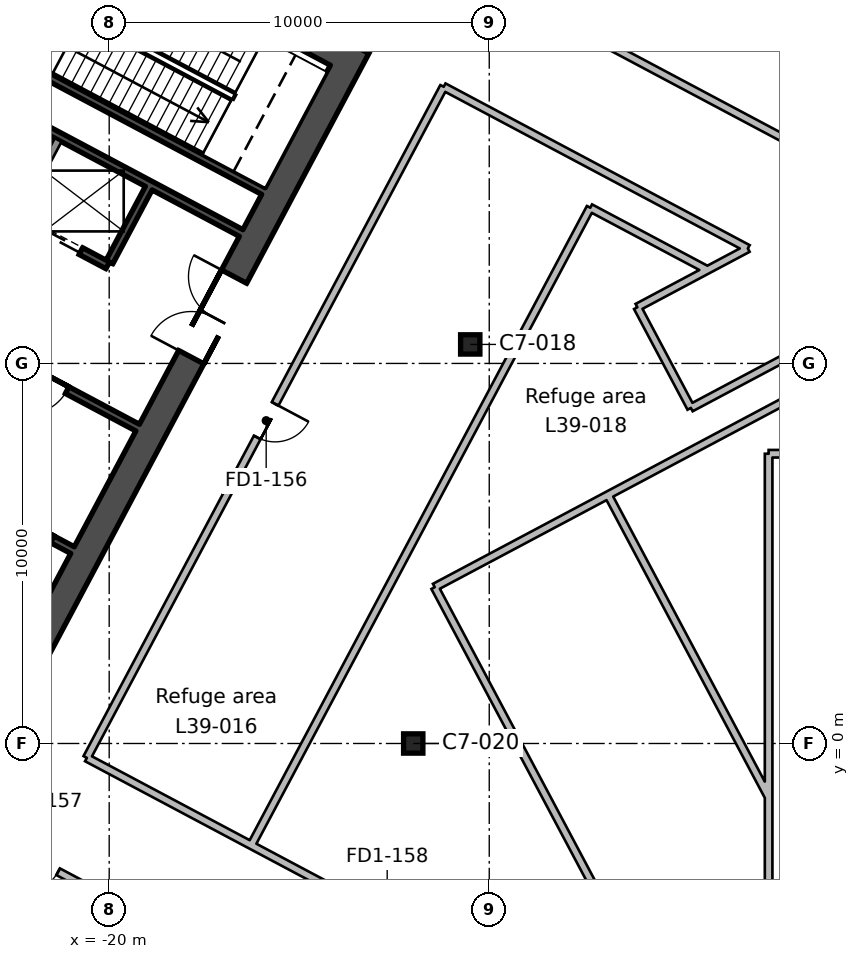
"""IFC4 building model, lengths in metres.
Left out: names, types, materials, properties, quantities, classifications, styles, units other than length and angle.
Written with IfcOpenShell. Run it as: python <this file> out.ifc"""

import sys

from ifc_helpers import new_model, si_unit, direction, frame, frame_2d, origin, origin_2d, place, context, subcontext, project, spatial, rectangle, hollow_rectangle, extrude, element, fill, save


model = new_model("IFC4")
c1 = context("Model", 3, precision=1e-05, world=origin(), true_north=direction((0.0, 1.0)))
c2 = subcontext(c1, "Body", "Model", "MODEL_VIEW")
j1 = project(units=[si_unit("LENGTHUNIT", "METRE"), si_unit("PLANEANGLEUNIT", "RADIAN")], contexts=[c1])
p1 = place(None, origin())
s1 = spatial("IfcSite", under=j1, at=p1, CompositionType="ELEMENT")
p2 = place(p1, origin())
s2 = spatial("IfcBuilding", under=s1, at=p2, CompositionType="ELEMENT")
p3 = place(p2, frame((0.0, 0.0, 183.6)))
s3 = spatial("IfcBuildingStorey", under=s2, at=p3, CompositionType="ELEMENT", Elevation=183.6)
for number, where, z_axis, x_axis in (
    (1, (-12.0, 0.0, 0.0), (0.0, 0.0, 1.0), (1.0, 0.0, 0.0)),
    (2, (-10.5, 10.5, 0.0), (0.0, 0.0, 1.0), (1.0, 0.0, 0.0)),
):
    element("IfcColumn", number, at=place(p3, frame(where, z_axis=z_axis, x_axis=x_axis)), inside=s3, PredefinedType="COLUMN", context=c2, shape_type="SweptSolid", body=[
        extrude(hollow_rectangle(XDim=0.508, YDim=0.508, WallThickness=0.012, InnerFilletRadius=0.006, OuterFilletRadius=0.018, at=origin_2d()), origin(), (0.0, 0.0, 1.0), 6.0),
    ])
p4 = place(p3, frame((-13.498, 18.333, 0.0), z_axis=(0.0, 0.0, 1.0), x_axis=(-0.469469918705, -0.88294846703, 0.0)))
e3 = element("IfcWall", 3, at=p4, inside=s3, PredefinedType="SHEAR", context=c2, shape_type="SweptSolid", body=[
    extrude(rectangle(XDim=19.7, YDim=0.75, at=frame_2d((9.85, 0.0))), origin(), (0.0, 0.0, 1.0), 6.0),
])
p5 = place(p4, frame((6.85, 0.0, 0.0)))
e4 = element("IfcOpeningElement", 4, at=p5, cuts=e3, PredefinedType="OPENING", context=c2, shape_type="SweptSolid", body=[
    extrude(rectangle(XDim=2.4, YDim=2.4, at=frame_2d((1.2, 1.2))), frame((0.0, 0.385, 0.0), z_axis=(0.0, -1.0, 0.0), x_axis=(1.0, 0.0, 0.0)), (0.0, 0.0, 1.0), 0.77),
])
p6 = place(p3, frame((-14.005, 18.178, 0.0), z_axis=(0.0, 0.0, 1.0), x_axis=(-0.88295010195, 0.469466843842, 0.0)))
e5 = element("IfcWall", 5, at=p6, inside=s3, PredefinedType="SHEAR", context=c2, shape_type="SweptSolid", body=[
    extrude(rectangle(XDim=20.2, YDim=0.75, at=frame_2d((10.1, 0.0))), origin(), (0.0, 0.0, 1.0), 6.0),
])
p7 = place(p3, frame((-18.96, 14.611, 0.0), z_axis=(0.0, 0.0, 1.0), x_axis=(-0.4694473164, -0.882960484464, 0.0)))
e6 = element("IfcWall", 6, at=p7, inside=s3, PredefinedType="SHEAR", context=c2, shape_type="SweptSolid", body=[
    extrude(rectangle(XDim=2.2, YDim=0.2, at=frame_2d((1.1, 0.0))), origin(), (0.0, 0.0, 1.0), 6.0),
])
p8 = place(p3, frame((-21.344, 15.879, 0.0), z_axis=(0.0, 0.0, 1.0), x_axis=(-0.4694473164, -0.882960484464, 0.0)))
e7 = element("IfcWall", 7, at=p8, inside=s3, PredefinedType="SOLIDWALL", context=c2, shape_type="SweptSolid", body=[
    extrude(rectangle(XDim=2.2, YDim=0.2, at=frame_2d((1.1, 0.0))), origin(), (0.0, 0.0, 1.0), 6.0),
])
p9 = place(p3, frame((-21.333, 21.649, 0.0), z_axis=(0.0, 0.0, 1.0), x_axis=(-0.469494272526, -0.882935517501, 0.0)))
e8 = element("IfcWall", 8, at=p9, inside=s3, PredefinedType="SHEAR", context=c2, shape_type="SweptSolid", body=[
    extrude(rectangle(XDim=7.3, YDim=0.2, at=frame_2d((3.65, 0.0))), origin(), (0.0, 0.0, 1.0), 6.0),
])
p10 = place(p9, frame((1.3, 0.0, 0.0)))
e9 = element("IfcOpeningElement", 9, at=p10, cuts=e8, PredefinedType="OPENING", context=c2, shape_type="SweptSolid", body=[
    extrude(rectangle(XDim=1.2, YDim=2.1, at=frame_2d((0.6, 1.05))), frame((0.0, 0.11, 0.0), z_axis=(0.0, -1.0, 0.0), x_axis=(1.0, 0.0, 0.0)), (0.0, 0.0, 1.0), 0.22),
])
p11 = place(p3, frame((-15.942, 14.536, 0.0), z_axis=(0.0, 0.0, 1.0), x_axis=(-0.882946947542, 0.469472776449, 0.0)))
e10 = element("IfcWall", 10, at=p11, inside=s3, PredefinedType="SHEAR", context=c2, shape_type="SweptSolid", body=[
    extrude(rectangle(XDim=8.0, YDim=0.2, at=frame_2d((4.0, 0.0))), origin(), (0.0, 0.0, 1.0), 6.0),
])
p12 = place(p3, frame((-16.529, 13.432, 0.0), z_axis=(0.0, 0.0, 1.0), x_axis=(-0.88295287151, 0.469461634952, 0.0)))
e11 = element("IfcWall", 11, at=p12, inside=s3, PredefinedType="SHEAR", context=c2, shape_type="SweptSolid", body=[
    extrude(rectangle(XDim=8.0, YDim=0.2, at=frame_2d((4.0, 0.0))), origin(), (0.0, 0.0, 1.0), 6.0),
])
p13 = place(p3, frame((-20.04, 12.581, 0.0), z_axis=(0.0, 0.0, 1.0), x_axis=(-0.882942972946, 0.469480251476, 0.0)))
e12 = element("IfcWall", 12, at=p13, inside=s3, PredefinedType="SHEAR", context=c2, shape_type="SweptSolid", body=[
    extrude(rectangle(XDim=5.4, YDim=0.2, at=frame_2d((2.7, 0.0))), origin(), (0.0, 0.0, 1.0), 6.0),
])
p14 = place(p13, frame((0.8, 0.0, 0.0)))
e13 = element("IfcOpeningElement", 13, at=p14, cuts=e12, PredefinedType="OPENING", context=c2, shape_type="SweptSolid", body=[
    extrude(rectangle(XDim=1.1, YDim=2.1, at=frame_2d((0.55, 1.05))), frame((0.0, 0.11, 0.0), z_axis=(0.0, -1.0, 0.0), x_axis=(1.0, 0.0, 0.0)), (0.0, 0.0, 1.0), 0.22),
])
p15 = place(p13, frame((3.5, 0.0, 0.0)))
e14 = element("IfcOpeningElement", 14, at=p15, cuts=e12, PredefinedType="OPENING", context=c2, shape_type="SweptSolid", body=[
    extrude(rectangle(XDim=1.1, YDim=2.1, at=frame_2d((0.55, 1.05))), frame((0.0, 0.11, 0.0), z_axis=(0.0, -1.0, 0.0), x_axis=(1.0, 0.0, 0.0)), (0.0, 0.0, 1.0), 0.22),
])
p16 = place(p3, frame((-19.252, 8.311, 0.0), z_axis=(0.0, 0.0, 1.0), x_axis=(-0.882955722218, 0.469456273365, 0.0)))
e15 = element("IfcWall", 15, at=p16, inside=s3, PredefinedType="SHEAR", context=c2, shape_type="SweptSolid", body=[
    extrude(rectangle(XDim=10.0, YDim=0.2, at=frame_2d((5.0, 0.0))), origin(), (0.0, 0.0, 1.0), 6.0),
])
p17 = place(p16, frame((2.1, 0.0, 0.0)))
e16 = element("IfcOpeningElement", 16, at=p17, cuts=e15, PredefinedType="OPENING", context=c2, shape_type="SweptSolid", body=[
    extrude(rectangle(XDim=1.2, YDim=2.1, at=frame_2d((0.6, 1.05))), frame((0.0, 0.11, 0.0), z_axis=(0.0, -1.0, 0.0), x_axis=(1.0, 0.0, 0.0)), (0.0, 0.0, 1.0), 0.22),
])
p18 = place(p3, frame((-20.965, 5.088, 0.0), z_axis=(0.0, 0.0, 1.0), x_axis=(-0.882925986334, 0.469512196493, 0.0)))
e17 = element("IfcWall", 17, at=p18, inside=s3, PredefinedType="SHEAR", context=c2, shape_type="SweptSolid", body=[
    extrude(rectangle(XDim=4.5, YDim=0.2, at=frame_2d((2.25, 0.0))), origin(), (0.0, 0.0, 1.0), 6.0),
])
p19 = place(p18, frame((0.6, 0.0, 0.0)))
e18 = element("IfcOpeningElement", 18, at=p19, cuts=e17, PredefinedType="OPENING", context=c2, shape_type="SweptSolid", body=[
    extrude(rectangle(XDim=1.1, YDim=2.1, at=frame_2d((0.55, 1.05))), frame((0.0, 0.11, 0.0), z_axis=(0.0, -1.0, 0.0), x_axis=(1.0, 0.0, 0.0)), (0.0, 0.0, 1.0), 0.22),
])
p20 = place(p3, frame((-47.73, 40.102, 0.0), z_axis=(0.0, 0.0, 1.0), x_axis=(0.882942458257, -0.469481219441, 0.0)))
e19 = element("IfcWall", 19, at=p20, inside=s3, PredefinedType="PARTITIONING", context=c2, shape_type="SweptSolid", body=[
    extrude(rectangle(XDim=54.058, YDim=0.2, at=frame_2d((27.029, 0.0))), origin(), (0.0, 0.0, 1.0), 5.55),
])
p21 = place(p20, frame((38.665, 0.0, 0.0)))
e20 = element("IfcOpeningElement", 20, at=p21, cuts=e19, PredefinedType="OPENING", context=c2, shape_type="SweptSolid", body=[
    extrude(rectangle(XDim=1.0, YDim=2.1, at=frame_2d((0.5, 1.05))), frame((0.0, 0.11, 0.0), z_axis=(0.0, -1.0, 0.0), x_axis=(1.0, 0.0, 0.0)), (0.0, 0.0, 1.0), 0.22),
])
p22 = place(p20, frame((26.766, 0.0, 0.0)))
e21 = element("IfcOpeningElement", 21, at=p22, cuts=e19, PredefinedType="OPENING", context=c2, shape_type="SweptSolid", body=[
    extrude(rectangle(XDim=1.0, YDim=2.1, at=frame_2d((0.5, 1.05))), frame((0.0, 0.11, 0.0), z_axis=(0.0, -1.0, 0.0), x_axis=(1.0, 0.0, 0.0)), (0.0, 0.0, 1.0), 0.22),
])
p23 = place(p20, frame((20.465, 0.0, 0.0)))
e22 = element("IfcOpeningElement", 22, at=p23, cuts=e19, PredefinedType="OPENING", context=c2, shape_type="SweptSolid", body=[
    extrude(rectangle(XDim=1.0, YDim=2.1, at=frame_2d((0.5, 1.05))), frame((0.0, 0.11, 0.0), z_axis=(0.0, -1.0, 0.0), x_axis=(1.0, 0.0, 0.0)), (0.0, 0.0, 1.0), 0.22),
])
p24 = place(p20, frame((14.866, 0.0, 0.0)))
e23 = element("IfcOpeningElement", 23, at=p24, cuts=e19, PredefinedType="OPENING", context=c2, shape_type="SweptSolid", body=[
    extrude(rectangle(XDim=1.0, YDim=2.1, at=frame_2d((0.5, 1.05))), frame((0.0, 0.11, 0.0), z_axis=(0.0, -1.0, 0.0), x_axis=(1.0, 0.0, 0.0)), (0.0, 0.0, 1.0), 0.22),
])
p25 = place(p3, frame((-8.144, -10.393, 0.0), z_axis=(0.0, 0.0, 1.0), x_axis=(-0.882945087791, 0.469476274102, 0.0)))
e24 = element("IfcWall", 24, at=p25, inside=s3, PredefinedType="PARTITIONING", context=c2, shape_type="SweptSolid", body=[
    extrude(rectangle(XDim=43.66, YDim=0.2, at=frame_2d((21.83, 0.0))), origin(), (0.0, 0.0, 1.0), 5.55),
])
p26 = place(p25, frame((32.25, 0.0, 0.0)))
e25 = element("IfcOpeningElement", 25, at=p26, cuts=e24, PredefinedType="OPENING", context=c2, shape_type="SweptSolid", body=[
    extrude(rectangle(XDim=1.0, YDim=2.1, at=frame_2d((0.5, 1.05))), frame((0.0, 0.11, 0.0), z_axis=(0.0, -1.0, 0.0), x_axis=(1.0, 0.0, 0.0)), (0.0, 0.0, 1.0), 0.22),
])
p27 = place(p25, frame((21.35, 0.0, 0.0)))
e26 = element("IfcOpeningElement", 26, at=p27, cuts=e24, PredefinedType="OPENING", context=c2, shape_type="SweptSolid", body=[
    extrude(rectangle(XDim=1.0, YDim=2.1, at=frame_2d((0.5, 1.05))), frame((0.0, 0.11, 0.0), z_axis=(0.0, -1.0, 0.0), x_axis=(1.0, 0.0, 0.0)), (0.0, 0.0, 1.0), 0.22),
])
p28 = place(p25, frame((14.95, 0.0, 0.0)))
e27 = element("IfcOpeningElement", 27, at=p28, cuts=e24, PredefinedType="OPENING", context=c2, shape_type="SweptSolid", body=[
    extrude(rectangle(XDim=1.0, YDim=2.1, at=frame_2d((0.5, 1.05))), frame((0.0, 0.11, 0.0), z_axis=(0.0, -1.0, 0.0), x_axis=(1.0, 0.0, 0.0)), (0.0, 0.0, 1.0), 0.22),
])
p29 = place(p25, frame((4.35, 0.0, 0.0)))
e28 = element("IfcOpeningElement", 28, at=p29, cuts=e24, PredefinedType="OPENING", context=c2, shape_type="SweptSolid", body=[
    extrude(rectangle(XDim=1.0, YDim=2.1, at=frame_2d((0.5, 1.05))), frame((0.0, 0.11, 0.0), z_axis=(0.0, -1.0, 0.0), x_axis=(1.0, 0.0, 0.0)), (0.0, 0.0, 1.0), 0.22),
])
p30 = place(p3, frame((-15.353, -0.97, 0.0), z_axis=(0.0, 0.0, 1.0), x_axis=(0.469461347352, 0.882953024426, 0.0)))
e29 = element("IfcWall", 29, at=p30, inside=s3, PredefinedType="PARTITIONING", context=c2, shape_type="SweptSolid", body=[
    extrude(rectangle(XDim=17.064, YDim=0.2, at=frame_2d((8.532, 0.0))), origin(), (0.0, 0.0, 1.0), 5.55),
])
p31 = place(p3, frame((-7.342, 14.097, 0.0), z_axis=(0.0, 0.0, 1.0), x_axis=(0.883005616924, -0.469362419118, 0.0)))
e30 = element("IfcWall", 30, at=p31, inside=s3, PredefinedType="PARTITIONING", context=c2, shape_type="SweptSolid", body=[
    extrude(rectangle(XDim=3.475, YDim=0.2, at=frame_2d((1.737, 0.0))), origin(), (0.0, 0.0, 1.0), 5.55),
])
p32 = place(p3, frame((-15.353, -0.97, 0.0), z_axis=(0.0, 0.0, 1.0), x_axis=(-0.469573229387, -0.88289352826, 0.0)))
e31 = element("IfcWall", 31, at=p32, inside=s3, PredefinedType="PARTITIONING", context=c2, shape_type="SweptSolid", body=[
    extrude(rectangle(XDim=1.936, YDim=0.2, at=frame_2d((0.968, 0.0))), origin(), (0.0, 0.0, 1.0), 5.55),
])
p33 = place(p3, frame((-20.588, -0.379, 0.0), z_axis=(0.0, 0.0, 1.0), x_axis=(0.469489882812, 0.882937851685, 0.0)))
e32 = element("IfcWall", 32, at=p33, inside=s3, PredefinedType="PARTITIONING", context=c2, shape_type="SweptSolid", body=[
    extrude(rectangle(XDim=20.0, YDim=0.2, at=frame_2d((10.0, 0.0))), origin(), (0.0, 0.0, 1.0), 5.55),
])
p34 = place(p33, frame((9.55, 0.0, 0.0)))
e33 = element("IfcOpeningElement", 33, at=p34, cuts=e32, PredefinedType="OPENING", context=c2, shape_type="SweptSolid", body=[
    extrude(rectangle(XDim=1.0, YDim=2.1, at=frame_2d((0.5, 1.05))), frame((0.0, 0.11, 0.0), z_axis=(0.0, -1.0, 0.0), x_axis=(1.0, 0.0, 0.0)), (0.0, 0.0, 1.0), 0.22),
])
p35 = place(p3, frame((-11.198, 17.28, 0.0), z_axis=(0.0, 0.0, 1.0), x_axis=(0.882952451638, -0.469462424637, 0.0)))
e34 = element("IfcWall", 34, at=p35, inside=s3, PredefinedType="PARTITIONING", context=c2, shape_type="SweptSolid", body=[
    extrude(rectangle(XDim=9.064, YDim=0.2, at=frame_2d((4.532, 0.0))), origin(), (0.0, 0.0, 1.0), 5.55),
])
p36 = place(p3, frame((-6.873, 6.538, 0.0), z_axis=(0.0, 0.0, 1.0), x_axis=(-0.882996997183, -0.469378634969, 0.0)))
e35 = element("IfcWall", 35, at=p36, inside=s3, PredefinedType="PARTITIONING", context=c2, shape_type="SweptSolid", body=[
    extrude(rectangle(XDim=5.167, YDim=0.2, at=frame_2d((2.583, 0.0))), origin(), (0.0, 0.0, 1.0), 5.55),
])
p37 = place(p3, frame((-11.435, 4.113, 0.0), z_axis=(0.0, 0.0, 1.0), x_axis=(0.469480251476, -0.882942972946, 0.0)))
e36 = element("IfcWall", 36, at=p37, inside=s3, PredefinedType="PARTITIONING", context=c2, shape_type="SweptSolid", body=[
    extrude(rectangle(XDim=11.532, YDim=0.2, at=frame_2d((5.766, 0.0))), origin(), (0.0, 0.0, 1.0), 5.55),
])
p38 = place(p3, frame((0.0, 10.193, 0.0), z_axis=(0.0, 0.0, 1.0), x_axis=(-0.882917481192, -0.469528190215, 0.0)))
e37 = element("IfcWall", 37, at=p38, inside=s3, PredefinedType="PARTITIONING", context=c2, shape_type="SweptSolid", body=[
    extrude(rectangle(XDim=7.784, YDim=0.2, at=frame_2d((3.892, 0.0))), origin(), (0.0, 0.0, 1.0), 5.55),
])
p39 = place(p3, frame((-2.649, -1.407, 0.0), z_axis=(0.0, 0.0, 1.0), x_axis=(-0.469441525693, 0.882963563209, 0.0)))
e38 = element("IfcWall", 38, at=p39, inside=s3, PredefinedType="PARTITIONING", context=c2, shape_type="SweptSolid", body=[
    extrude(rectangle(XDim=8.998, YDim=0.2, at=frame_2d((4.499, 0.0))), origin(), (0.0, 0.0, 1.0), 5.55),
])
p40 = place(p3, frame((-4.265, 12.456, 0.0), z_axis=(0.0, 0.0, 1.0), x_axis=(0.882943477621, 0.469479302341, 0.0)))
e39 = element("IfcWall", 39, at=p40, inside=s3, PredefinedType="PARTITIONING", context=c2, shape_type="SweptSolid", body=[
    extrude(rectangle(XDim=1.212, YDim=0.2, at=frame_2d((0.606, 0.0))), origin(), (0.0, 0.0, 1.0), 5.55),
])
p41 = place(p3, frame((-20.588, -0.379, 0.0), z_axis=(0.0, 0.0, 1.0), x_axis=(0.882951465933, -0.469464278521, 0.0)))
e40 = element("IfcWall", 40, at=p41, inside=s3, PredefinedType="PARTITIONING", context=c2, shape_type="SweptSolid", body=[
    extrude(rectangle(XDim=18.0, YDim=0.2, at=frame_2d((9.0, 0.0))), origin(), (0.0, 0.0, 1.0), 5.55),
])
p42 = place(p41, frame((8.45, 0.0, 0.0)))
e41 = element("IfcOpeningElement", 41, at=p42, cuts=e40, PredefinedType="OPENING", context=c2, shape_type="SweptSolid", body=[
    extrude(rectangle(XDim=1.0, YDim=2.1, at=frame_2d((0.5, 1.05))), frame((0.0, 0.11, 0.0), z_axis=(0.0, -1.0, 0.0), x_axis=(1.0, 0.0, 0.0)), (0.0, 0.0, 1.0), 0.22),
])
p43 = place(p3, frame((-1.075, 10.754, 0.0), z_axis=(0.0, 0.0, 1.0), x_axis=(-0.88295221972, -0.469462860822, 0.0)))
e42 = element("IfcWall", 42, at=p43, inside=s3, PredefinedType="PARTITIONING", context=c2, shape_type="SweptSolid", body=[
    extrude(rectangle(XDim=4.1, YDim=0.2, at=frame_2d((2.05, 0.0))), origin(), (0.0, 0.0, 1.0), 5.55),
])
p44 = place(p3, frame((-4.695, 8.829, 0.0), z_axis=(0.0, 0.0, 1.0), x_axis=(-0.469341661158, 0.883016650523, 0.0)))
e43 = element("IfcWall", 43, at=p44, inside=s3, PredefinedType="PARTITIONING", context=c2, shape_type="SweptSolid", body=[
    extrude(rectangle(XDim=3.0, YDim=0.2, at=frame_2d((1.5, 0.0))), origin(), (0.0, 0.0, 1.0), 5.55),
])
p45 = place(p3, frame((-6.103, 11.478, 0.0), z_axis=(0.0, 0.0, 1.0), x_axis=(0.882813423711, 0.469723811314, 0.0)))
e44 = element("IfcWall", 44, at=p45, inside=s3, PredefinedType="PARTITIONING", context=c2, shape_type="SweptSolid", body=[
    extrude(rectangle(XDim=2.082, YDim=0.2, at=frame_2d((1.041, 0.0))), origin(), (0.0, 0.0, 1.0), 5.55),
])
p46 = place(p3, frame((-2.649, 7.624, 0.0), z_axis=(0.0, 0.0, 1.0), x_axis=(0.0, -1.0, 0.0)))
e45 = element("IfcWall", 45, at=p46, inside=s3, PredefinedType="PARTITIONING", context=c2, shape_type="SweptSolid", body=[
    extrude(rectangle(XDim=8.921, YDim=0.2, at=frame_2d((4.46, 0.0))), origin(), (0.0, 0.0, 1.0), 5.55),
])
p47 = place(p3, frame((-2.649, 7.624, 0.0), z_axis=(0.0, 0.0, 1.0), x_axis=(1.0, 0.0, 0.0)))
e46 = element("IfcWall", 46, at=p47, inside=s3, PredefinedType="PARTITIONING", context=c2, shape_type="SweptSolid", body=[
    extrude(rectangle(XDim=5.298, YDim=0.2, at=frame_2d((2.649, 0.0))), origin(), (0.0, 0.0, 1.0), 5.55),
])
p48 = place(p3, frame((-2.649, -15.84, 0.0), z_axis=(0.0, 0.0, 1.0), x_axis=(0.0, 1.0, 0.0)))
e47 = element("IfcWall", 47, at=p48, inside=s3, PredefinedType="PARTITIONING", context=c2, shape_type="SweptSolid", body=[
    extrude(rectangle(XDim=14.543, YDim=0.2, at=frame_2d((7.271, 0.0))), origin(), (0.0, 0.0, 1.0), 5.55),
])
p49 = place(p5, frame((2.4, 0.0, 0.0), z_axis=(0.0, 0.0, 1.0), x_axis=(-1.0, 0.0, 0.0)))
e48 = element("IfcDoor", 48, at=p49, inside=s3, OperationType="DOUBLE_DOOR_SINGLE_SWING", PredefinedType="DOOR", context=c2, shape_type="SweptSolid", body=[
    extrude(rectangle(XDim=2.4, YDim=2.4, at=frame_2d((1.2, 1.2))), frame((0.0, 0.025, 0.0), z_axis=(0.0, -1.0, 0.0), x_axis=(1.0, 0.0, 0.0)), (0.0, 0.0, 1.0), 0.05),
])
fill(e4, e48)
p50 = place(p17, origin())
e49 = element("IfcDoor", 49, at=p50, inside=s3, OperationType="SINGLE_SWING_RIGHT", PredefinedType="DOOR", context=c2, shape_type="SweptSolid", body=[
    extrude(rectangle(XDim=1.2, YDim=2.1, at=frame_2d((0.6, 1.05))), frame((0.0, 0.025, 0.0), z_axis=(0.0, -1.0, 0.0), x_axis=(1.0, 0.0, 0.0)), (0.0, 0.0, 1.0), 0.05),
])
fill(e16, e49)
p51 = place(p14, origin())
e50 = element("IfcDoor", 50, at=p51, inside=s3, OperationType="DOUBLE_DOOR_SLIDING", PredefinedType="DOOR", context=c2, shape_type="SweptSolid", body=[
    extrude(rectangle(XDim=1.1, YDim=2.1, at=frame_2d((0.55, 1.05))), frame((0.0, 0.025, 0.0), z_axis=(0.0, -1.0, 0.0), x_axis=(1.0, 0.0, 0.0)), (0.0, 0.0, 1.0), 0.05),
])
fill(e13, e50)
p52 = place(p19, origin())
e51 = element("IfcDoor", 51, at=p52, inside=s3, OperationType="DOUBLE_DOOR_SLIDING", PredefinedType="DOOR", context=c2, shape_type="SweptSolid", body=[
    extrude(rectangle(XDim=1.1, YDim=2.1, at=frame_2d((0.55, 1.05))), frame((0.0, 0.025, 0.0), z_axis=(0.0, -1.0, 0.0), x_axis=(1.0, 0.0, 0.0)), (0.0, 0.0, 1.0), 0.05),
])
fill(e18, e51)
p53 = place(p34, frame((1.0, 0.0, 0.0), z_axis=(0.0, 0.0, 1.0), x_axis=(-1.0, 0.0, 0.0)))
e52 = element("IfcDoor", 52, at=p53, inside=s3, OperationType="SINGLE_SWING_LEFT", PredefinedType="DOOR", context=c2, shape_type="SweptSolid", body=[
    extrude(rectangle(XDim=1.0, YDim=2.1, at=frame_2d((0.5, 1.05))), frame((0.0, 0.025, 0.0), z_axis=(0.0, -1.0, 0.0), x_axis=(1.0, 0.0, 0.0)), (0.0, 0.0, 1.0), 0.05),
])
fill(e33, e52)
p54 = place(p28, origin())
e53 = element("IfcDoor", 53, at=p54, inside=s3, OperationType="SINGLE_SWING_RIGHT", PredefinedType="DOOR", context=c2, shape_type="SweptSolid", body=[
    extrude(rectangle(XDim=1.0, YDim=2.1, at=frame_2d((0.5, 1.05))), frame((0.0, 0.025, 0.0), z_axis=(0.0, -1.0, 0.0), x_axis=(1.0, 0.0, 0.0)), (0.0, 0.0, 1.0), 0.05),
])
fill(e27, e53)
save(model, sys.argv[1])
